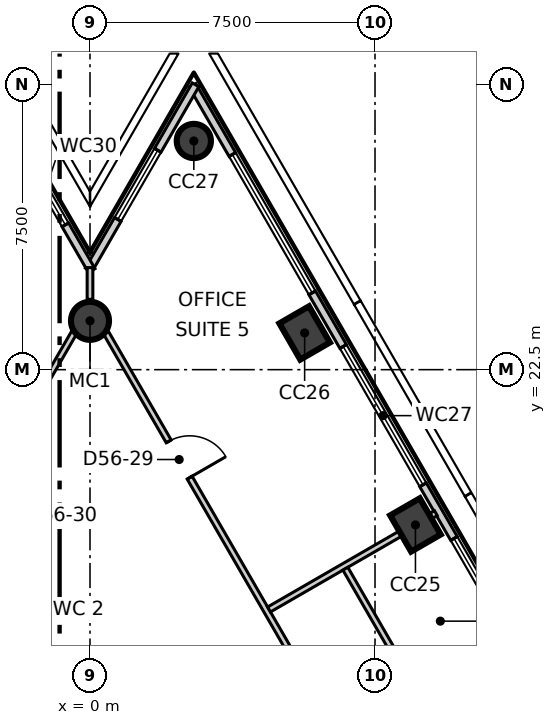
"""IFC4 building model, lengths in metres.
Left out: names, types, materials, properties, quantities, classifications, styles, units other than length and angle.
Written with IfcOpenShell. Run it as: python <this file> out.ifc"""

import sys

from ifc_helpers import new_model, si_unit, direction, frame, frame_2d, origin, origin_2d, place, context, subcontext, project, spatial, rectangle, circle, extrude, element, fill, save


model = new_model("IFC4")
c1 = context("Model", 3, precision=1e-05, world=origin(), true_north=direction((0.0, 1.0)))
c2 = subcontext(c1, "Body", "Model", "MODEL_VIEW")
j1 = project(units=[si_unit("LENGTHUNIT", "METRE"), si_unit("PLANEANGLEUNIT", "RADIAN")], contexts=[c1])
p1 = place(None, origin())
s1 = spatial("IfcSite", under=j1, at=p1, CompositionType="ELEMENT")
p2 = place(p1, origin())
s2 = spatial("IfcBuilding", under=s1, at=p2, CompositionType="ELEMENT")
p3 = place(p2, frame((0.0, 0.0, 239.3)))
s3 = spatial("IfcBuildingStorey", under=s2, at=p3, CompositionType="ELEMENT", Elevation=239.3)
for number, where, z_axis, x_axis in (
    (1, (8.564, 18.414, -0.3), (0.0, 0.0, 1.0), (-0.5, 0.866, 0.0)),
    (2, (5.648, 23.466, -0.3), (0.0, 0.0, 1.0), (-0.5, 0.866, 0.0)),
):
    element("IfcColumn", number, at=place(p3, frame(where, z_axis=z_axis, x_axis=x_axis)), inside=s3, PredefinedType="COLUMN", context=c2, shape_type="SweptSolid", body=[
        extrude(rectangle(XDim=1.1, YDim=0.9, at=origin_2d()), origin(), (0.0, 0.0, 1.0), 4.0),
    ])
p4 = place(p3, frame((2.732, 28.517, -0.3), z_axis=(0.0, 0.0, 1.0), x_axis=(-0.5, 0.866025403784, 0.0)))
e3 = element("IfcColumn", 3, at=p4, inside=s3, PredefinedType="COLUMN", context=c2, shape_type="SweptSolid", body=[
    extrude(circle(Radius=0.45, at=origin_2d()), origin(), (0.0, 0.0, 1.0), 4.0),
])
p5 = place(p3, frame((0.0, 23.785, -0.3), z_axis=(0.0, 0.0, 1.0), x_axis=(1.0, 0.0, 0.0)))
e4 = element("IfcColumn", 4, at=p5, inside=s3, PredefinedType="COLUMN", context=c2, shape_type="SweptSolid", body=[
    extrude(circle(Radius=0.5, at=origin_2d()), origin(), (0.0, 0.0, 1.0), 4.0),
])
p6 = place(p3, frame((27.32, -12.671, 0.0), z_axis=(0.0, 0.0, 1.0), x_axis=(-0.499995097538, 0.866028234204, 0.0)))
e5 = element("IfcWall", 5, at=p6, inside=s3, PredefinedType="ELEMENTEDWALL", context=c2, shape_type="SweptSolid", body=[
    extrude(rectangle(XDim=49.247, YDim=0.2, at=frame_2d((24.623, 0.0))), origin(), (0.0, 0.0, 1.0), 3.7),
])
p7 = place(p6, frame((2.119, 0.0, 0.9)))
e6 = element("IfcOpeningElement", 6, at=p7, cuts=e5, PredefinedType="OPENING", context=c2, shape_type="SweptSolid", body=[
    extrude(rectangle(XDim=4.2, YDim=2.5, at=frame_2d((2.1, 1.25))), frame((0.0, 0.11, 0.0), z_axis=(0.0, -1.0, 0.0), x_axis=(1.0, 0.0, 0.0)), (0.0, 0.0, 1.0), 0.22),
])
p8 = place(p6, frame((7.952, 0.0, 0.9)))
e7 = element("IfcOpeningElement", 7, at=p8, cuts=e5, PredefinedType="OPENING", context=c2, shape_type="SweptSolid", body=[
    extrude(rectangle(XDim=4.2, YDim=2.5, at=frame_2d((2.1, 1.25))), frame((0.0, 0.11, 0.0), z_axis=(0.0, -1.0, 0.0), x_axis=(1.0, 0.0, 0.0)), (0.0, 0.0, 1.0), 0.22),
])
p9 = place(p6, frame((13.784, 0.0, 0.9)))
e8 = element("IfcOpeningElement", 8, at=p9, cuts=e5, PredefinedType="OPENING", context=c2, shape_type="SweptSolid", body=[
    extrude(rectangle(XDim=4.2, YDim=2.5, at=frame_2d((2.1, 1.25))), frame((0.0, 0.11, 0.0), z_axis=(0.0, -1.0, 0.0), x_axis=(1.0, 0.0, 0.0)), (0.0, 0.0, 1.0), 0.22),
])
p10 = place(p6, frame((19.617, 0.0, 0.9)))
e9 = element("IfcOpeningElement", 9, at=p10, cuts=e5, PredefinedType="OPENING", context=c2, shape_type="SweptSolid", body=[
    extrude(rectangle(XDim=4.2, YDim=2.5, at=frame_2d((2.1, 1.25))), frame((0.0, 0.11, 0.0), z_axis=(0.0, -1.0, 0.0), x_axis=(1.0, 0.0, 0.0)), (0.0, 0.0, 1.0), 0.22),
])
p11 = place(p6, frame((25.45, 0.0, 0.9)))
e10 = element("IfcOpeningElement", 10, at=p11, cuts=e5, PredefinedType="OPENING", context=c2, shape_type="SweptSolid", body=[
    extrude(rectangle(XDim=4.2, YDim=2.5, at=frame_2d((2.1, 1.25))), frame((0.0, 0.11, 0.0), z_axis=(0.0, -1.0, 0.0), x_axis=(1.0, 0.0, 0.0)), (0.0, 0.0, 1.0), 0.22),
])
p12 = place(p6, frame((31.282, 0.0, 0.9)))
e11 = element("IfcOpeningElement", 11, at=p12, cuts=e5, PredefinedType="OPENING", context=c2, shape_type="SweptSolid", body=[
    extrude(rectangle(XDim=4.2, YDim=2.5, at=frame_2d((2.1, 1.25))), frame((0.0, 0.11, 0.0), z_axis=(0.0, -1.0, 0.0), x_axis=(1.0, 0.0, 0.0)), (0.0, 0.0, 1.0), 0.22),
])
p13 = place(p6, frame((37.115, 0.0, 0.9)))
e12 = element("IfcOpeningElement", 12, at=p13, cuts=e5, PredefinedType="OPENING", context=c2, shape_type="SweptSolid", body=[
    extrude(rectangle(XDim=4.2, YDim=2.5, at=frame_2d((2.1, 1.25))), frame((0.0, 0.11, 0.0), z_axis=(0.0, -1.0, 0.0), x_axis=(1.0, 0.0, 0.0)), (0.0, 0.0, 1.0), 0.22),
])
p14 = place(p6, frame((42.947, 0.0, 0.9)))
e13 = element("IfcOpeningElement", 13, at=p14, cuts=e5, PredefinedType="OPENING", context=c2, shape_type="SweptSolid", body=[
    extrude(rectangle(XDim=4.2, YDim=2.5, at=frame_2d((2.1, 1.25))), frame((0.0, 0.11, 0.0), z_axis=(0.0, -1.0, 0.0), x_axis=(1.0, 0.0, 0.0)), (0.0, 0.0, 1.0), 0.22),
])
p15 = place(p3, frame((2.777, 29.995, 0.0), z_axis=(0.0, 0.0, 1.0), x_axis=(-0.499957919771, -0.866049697453, 0.0)))
e14 = element("IfcWall", 14, at=p15, inside=s3, PredefinedType="ELEMENTEDWALL", context=c2, shape_type="SweptSolid", body=[
    extrude(rectangle(XDim=5.625, YDim=0.2, at=frame_2d((2.812, 0.0))), origin(), (0.0, 0.0, 1.0), 3.7),
])
p16 = place(p15, frame((1.99, 0.0, 0.9)))
e15 = element("IfcOpeningElement", 15, at=p16, cuts=e14, PredefinedType="OPENING", context=c2, shape_type="SweptSolid", body=[
    extrude(rectangle(XDim=2.1, YDim=2.5, at=frame_2d((1.05, 1.25))), frame((0.0, 0.11, 0.0), z_axis=(0.0, -1.0, 0.0), x_axis=(1.0, 0.0, 0.0)), (0.0, 0.0, 1.0), 0.22),
])
p17 = place(p3, frame((0.045, 25.107, 0.0), z_axis=(0.0, 0.0, 1.0), x_axis=(-0.499957919771, 0.866049697453, 0.0)))
e16 = element("IfcWall", 16, at=p17, inside=s3, PredefinedType="ELEMENTEDWALL", context=c2, shape_type="SweptSolid", body=[
    extrude(rectangle(XDim=5.625, YDim=0.2, at=frame_2d((2.812, 0.0))), origin(), (0.0, 0.0, 1.0), 3.7),
])
p18 = place(p17, frame((1.39, 0.0, 0.9)))
e17 = element("IfcOpeningElement", 17, at=p18, cuts=e16, PredefinedType="OPENING", context=c2, shape_type="SweptSolid", body=[
    extrude(rectangle(XDim=2.1, YDim=2.5, at=frame_2d((1.05, 1.25))), frame((0.0, 0.11, 0.0), z_axis=(0.0, -1.0, 0.0), x_axis=(1.0, 0.0, 0.0)), (0.0, 0.0, 1.0), 0.22),
])
p19 = place(p3, frame((-20.883, -11.97, 0.0), z_axis=(0.0, 0.0, 1.0), x_axis=(0.500006150555, 0.866021852731, 0.0)))
e18 = element("IfcWall", 18, at=p19, inside=s3, PredefinedType="PARTITIONING", context=c2, shape_type="SweptSolid", body=[
    extrude(rectangle(XDim=41.766, YDim=0.15, at=frame_2d((20.883, 0.0))), origin(), (0.0, 0.0, 1.0), 3.7),
])
p20 = place(p19, frame((36.616, 0.0, 0.0)))
e19 = element("IfcOpeningElement", 19, at=p20, cuts=e18, PredefinedType="OPENING", context=c2, shape_type="SweptSolid", body=[
    extrude(rectangle(XDim=1.1, YDim=2.1, at=frame_2d((0.55, 1.05))), frame((0.0, 0.085, 0.0), z_axis=(0.0, -1.0, 0.0), x_axis=(1.0, 0.0, 0.0)), (0.0, 0.0, 1.0), 0.17),
])
p21 = place(p19, frame((21.723, 0.0, 0.0)))
e20 = element("IfcOpeningElement", 20, at=p21, cuts=e18, PredefinedType="OPENING", context=c2, shape_type="SweptSolid", body=[
    extrude(rectangle(XDim=1.1, YDim=2.1, at=frame_2d((0.55, 1.05))), frame((0.0, 0.085, 0.0), z_axis=(0.0, -1.0, 0.0), x_axis=(1.0, 0.0, 0.0)), (0.0, 0.0, 1.0), 0.17),
])
p22 = place(p19, frame((30.423, 0.0, 0.0)))
e21 = element("IfcOpeningElement", 21, at=p22, cuts=e18, PredefinedType="OPENING", context=c2, shape_type="SweptSolid", body=[
    extrude(rectangle(XDim=0.9, YDim=2.1, at=frame_2d((0.45, 1.05))), frame((0.0, 0.085, 0.0), z_axis=(0.0, -1.0, 0.0), x_axis=(1.0, 0.0, 0.0)), (0.0, 0.0, 1.0), 0.17),
])
p23 = place(p19, frame((27.223, 0.0, 0.0)))
e22 = element("IfcOpeningElement", 22, at=p23, cuts=e18, PredefinedType="OPENING", context=c2, shape_type="SweptSolid", body=[
    extrude(rectangle(XDim=0.9, YDim=2.1, at=frame_2d((0.45, 1.05))), frame((0.0, 0.085, 0.0), z_axis=(0.0, -1.0, 0.0), x_axis=(1.0, 0.0, 0.0)), (0.0, 0.0, 1.0), 0.17),
])
p24 = place(p19, frame((24.323, 0.0, 0.0)))
e23 = element("IfcOpeningElement", 23, at=p24, cuts=e18, PredefinedType="OPENING", context=c2, shape_type="SweptSolid", body=[
    extrude(rectangle(XDim=1.0, YDim=2.1, at=frame_2d((0.5, 1.05))), frame((0.0, 0.085, 0.0), z_axis=(0.0, -1.0, 0.0), x_axis=(1.0, 0.0, 0.0)), (0.0, 0.0, 1.0), 0.17),
])
p25 = place(p19, frame((17.358, 0.0, 0.0)))
e24 = element("IfcOpeningElement", 24, at=p25, cuts=e18, PredefinedType="OPENING", context=c2, shape_type="SweptSolid", body=[
    extrude(rectangle(XDim=1.0, YDim=2.1, at=frame_2d((0.5, 1.05))), frame((0.0, 0.085, 0.0), z_axis=(0.0, -1.0, 0.0), x_axis=(1.0, 0.0, 0.0)), (0.0, 0.0, 1.0), 0.17),
])
p26 = place(p19, frame((6.825, 0.0, 0.0)))
e25 = element("IfcOpeningElement", 25, at=p26, cuts=e18, PredefinedType="OPENING", context=c2, shape_type="SweptSolid", body=[
    extrude(rectangle(XDim=1.1, YDim=2.1, at=frame_2d((0.55, 1.05))), frame((0.0, 0.085, 0.0), z_axis=(0.0, -1.0, 0.0), x_axis=(1.0, 0.0, 0.0)), (0.0, 0.0, 1.0), 0.17),
])
p27 = place(p3, frame((0.0, 24.35, 0.0), z_axis=(0.0, 0.0, 1.0), x_axis=(0.0, 1.0, 0.0)))
e26 = element("IfcWall", 26, at=p27, inside=s3, PredefinedType="PARTITIONING", context=c2, shape_type="SweptSolid", body=[
    extrude(rectangle(XDim=0.835, YDim=0.15, at=frame_2d((0.417, 0.0))), origin(), (0.0, 0.0, 1.0), 3.7),
])
p28 = place(p3, frame((0.075, 24.07, 0.0), z_axis=(0.0, 0.0, 1.0), x_axis=(0.500006834213, -0.866021458014, 0.0)))
e27 = element("IfcWall", 27, at=p28, inside=s3, PredefinedType="PARTITIONING", context=c2, shape_type="SweptSolid", body=[
    extrude(rectangle(XDim=41.616, YDim=0.15, at=frame_2d((20.808, 0.0))), origin(), (0.0, 0.0, 1.0), 3.7),
])
p29 = place(p28, frame((36.616, 0.0, 0.0)))
e28 = element("IfcOpeningElement", 28, at=p29, cuts=e27, PredefinedType="OPENING", context=c2, shape_type="SweptSolid", body=[
    extrude(rectangle(XDim=1.1, YDim=2.1, at=frame_2d((0.55, 1.05))), frame((0.0, 0.085, 0.0), z_axis=(0.0, -1.0, 0.0), x_axis=(1.0, 0.0, 0.0)), (0.0, 0.0, 1.0), 0.17),
])
p30 = place(p28, frame((29.024, 0.0, 0.0)))
e29 = element("IfcOpeningElement", 29, at=p30, cuts=e27, PredefinedType="OPENING", context=c2, shape_type="SweptSolid", body=[
    extrude(rectangle(XDim=1.0, YDim=2.1, at=frame_2d((0.5, 1.05))), frame((0.0, 0.085, 0.0), z_axis=(0.0, -1.0, 0.0), x_axis=(1.0, 0.0, 0.0)), (0.0, 0.0, 1.0), 0.17),
])
p31 = place(p28, frame((23.19, 0.0, 0.0)))
e30 = element("IfcOpeningElement", 30, at=p31, cuts=e27, PredefinedType="OPENING", context=c2, shape_type="SweptSolid", body=[
    extrude(rectangle(XDim=1.0, YDim=2.1, at=frame_2d((0.5, 1.05))), frame((0.0, 0.085, 0.0), z_axis=(0.0, -1.0, 0.0), x_axis=(1.0, 0.0, 0.0)), (0.0, 0.0, 1.0), 0.17),
])
p32 = place(p28, frame((14.458, 0.0, 0.0)))
e31 = element("IfcOpeningElement", 31, at=p32, cuts=e27, PredefinedType="OPENING", context=c2, shape_type="SweptSolid", body=[
    extrude(rectangle(XDim=1.1, YDim=2.1, at=frame_2d((0.55, 1.05))), frame((0.0, 0.085, 0.0), z_axis=(0.0, -1.0, 0.0), x_axis=(1.0, 0.0, 0.0)), (0.0, 0.0, 1.0), 0.17),
])
p33 = place(p28, frame((3.993, 0.0, 0.0)))
e32 = element("IfcOpeningElement", 32, at=p33, cuts=e27, PredefinedType="OPENING", context=c2, shape_type="SweptSolid", body=[
    extrude(rectangle(XDim=1.1, YDim=2.1, at=frame_2d((0.55, 1.05))), frame((0.0, 0.085, 0.0), z_axis=(0.0, -1.0, 0.0), x_axis=(1.0, 0.0, 0.0)), (0.0, 0.0, 1.0), 0.17),
])
p34 = place(p3, frame((4.711, 16.19, 0.0), z_axis=(0.0, 0.0, 1.0), x_axis=(0.866065287345, 0.499930913282, 0.0)))
e33 = element("IfcWall", 33, at=p34, inside=s3, PredefinedType="PARTITIONING", context=c2, shape_type="SweptSolid", body=[
    extrude(rectangle(XDim=5.069, YDim=0.15, at=frame_2d((2.535, 0.0))), origin(), (0.0, 0.0, 1.0), 3.7),
])
p35 = place(p3, frame((6.72, 17.263, 0.0), z_axis=(0.0, 0.0, 1.0), x_axis=(0.499949415664, -0.866054606695, 0.0)))
e34 = element("IfcWall", 34, at=p35, inside=s3, PredefinedType="PARTITIONING", context=c2, shape_type="SweptSolid", body=[
    extrude(rectangle(XDim=11.515, YDim=0.15, at=frame_2d((5.758, 0.0))), origin(), (0.0, 0.0, 1.0), 3.7),
])
p36 = place(p35, frame((5.24, 0.0, 0.0)))
e35 = element("IfcOpeningElement", 35, at=p36, cuts=e34, PredefinedType="OPENING", context=c2, shape_type="SweptSolid", body=[
    extrude(rectangle(XDim=1.0, YDim=2.1, at=frame_2d((0.5, 1.05))), frame((0.0, 0.085, 0.0), z_axis=(0.0, -1.0, 0.0), x_axis=(1.0, 0.0, 0.0)), (0.0, 0.0, 1.0), 0.17),
])
p37 = place(p12, origin())
e36 = element("IfcWindow", 36, at=p37, inside=s3, PartitioningType="SINGLE_PANEL", PredefinedType="WINDOW", context=c2, shape_type="SweptSolid", body=[
    extrude(rectangle(XDim=4.2, YDim=2.5, at=frame_2d((2.1, 1.25))), frame((0.0, 0.03, 0.0), z_axis=(0.0, -1.0, 0.0), x_axis=(1.0, 0.0, 0.0)), (0.0, 0.0, 1.0), 0.06),
])
fill(e11, e36)
p38 = place(p13, origin())
e37 = element("IfcWindow", 37, at=p38, inside=s3, PartitioningType="SINGLE_PANEL", PredefinedType="WINDOW", context=c2, shape_type="SweptSolid", body=[
    extrude(rectangle(XDim=4.2, YDim=2.5, at=frame_2d((2.1, 1.25))), frame((0.0, 0.03, 0.0), z_axis=(0.0, -1.0, 0.0), x_axis=(1.0, 0.0, 0.0)), (0.0, 0.0, 1.0), 0.06),
])
fill(e12, e37)
p39 = place(p14, origin())
e38 = element("IfcWindow", 38, at=p39, inside=s3, PartitioningType="SINGLE_PANEL", PredefinedType="WINDOW", context=c2, shape_type="SweptSolid", body=[
    extrude(rectangle(XDim=4.2, YDim=2.5, at=frame_2d((2.1, 1.25))), frame((0.0, 0.03, 0.0), z_axis=(0.0, -1.0, 0.0), x_axis=(1.0, 0.0, 0.0)), (0.0, 0.0, 1.0), 0.06),
])
fill(e13, e38)
p40 = place(p16, origin())
e39 = element("IfcWindow", 39, at=p40, inside=s3, PartitioningType="SINGLE_PANEL", PredefinedType="WINDOW", context=c2, shape_type="SweptSolid", body=[
    extrude(rectangle(XDim=2.1, YDim=2.5, at=frame_2d((1.05, 1.25))), frame((0.0, 0.03, 0.0), z_axis=(0.0, -1.0, 0.0), x_axis=(1.0, 0.0, 0.0)), (0.0, 0.0, 1.0), 0.06),
])
fill(e15, e39)
p41 = place(p18, origin())
e40 = element("IfcWindow", 40, at=p41, inside=s3, PartitioningType="SINGLE_PANEL", PredefinedType="WINDOW", context=c2, shape_type="SweptSolid", body=[
    extrude(rectangle(XDim=2.1, YDim=2.5, at=frame_2d((1.05, 1.25))), frame((0.0, 0.03, 0.0), z_axis=(0.0, -1.0, 0.0), x_axis=(1.0, 0.0, 0.0)), (0.0, 0.0, 1.0), 0.06),
])
fill(e17, e40)
p42 = place(p33, origin())
e41 = element("IfcDoor", 41, at=p42, inside=s3, OperationType="SINGLE_SWING_LEFT", PredefinedType="DOOR", context=c2, shape_type="SweptSolid", body=[
    extrude(rectangle(XDim=1.1, YDim=2.1, at=frame_2d((0.55, 1.05))), frame((0.0, 0.025, 0.0), z_axis=(0.0, -1.0, 0.0), x_axis=(1.0, 0.0, 0.0)), (0.0, 0.0, 1.0), 0.05),
])
fill(e32, e41)
save(model, sys.argv[1])
